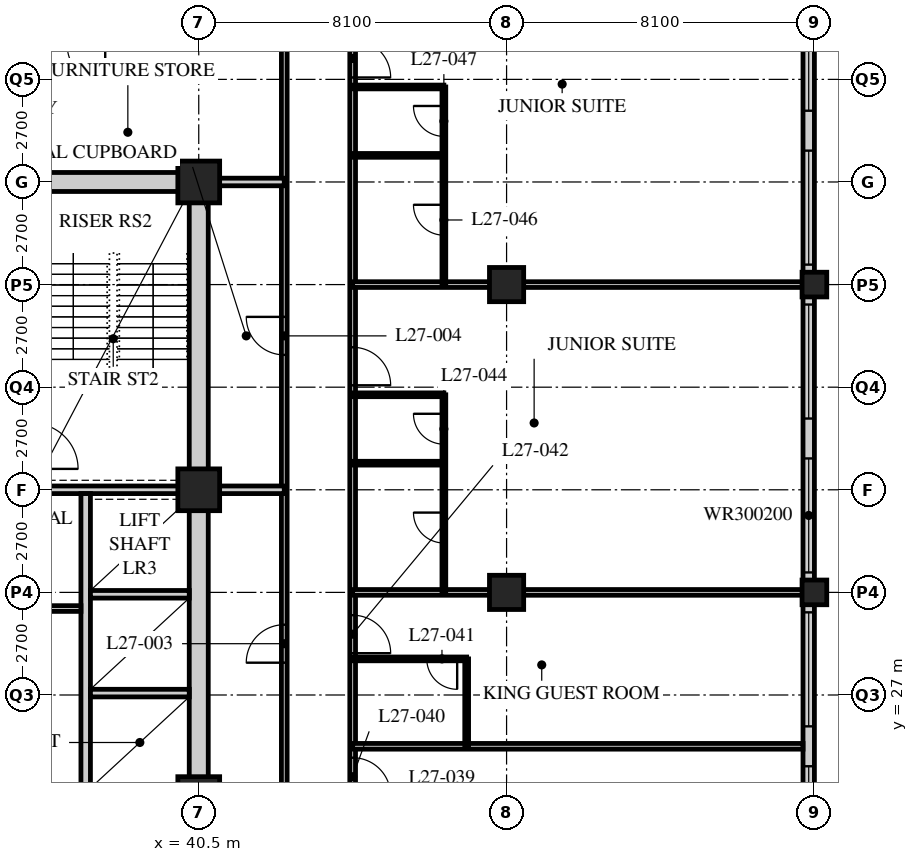
"""IFC4 building model, lengths in metres.
Left out: names, types, materials, properties, quantities, classifications, styles, units other than length and angle.
Written with IfcOpenShell. Run it as: python <this file> out.ifc"""

import sys

from ifc_helpers import new_model, si_unit, direction, frame, frame_2d, origin, origin_2d, place, context, subcontext, project, spatial, rectangle, hollow_rectangle, extrude, element, fill, save


model = new_model("IFC4")
c1 = context("Model", 3, precision=1e-05, world=origin(), true_north=direction((0.0, 1.0)))
c2 = subcontext(c1, "Body", "Model", "MODEL_VIEW")
j1 = project(units=[si_unit("LENGTHUNIT", "METRE"), si_unit("PLANEANGLEUNIT", "RADIAN")], contexts=[c1])
p1 = place(None, origin())
s1 = spatial("IfcSite", under=j1, at=p1, CompositionType="ELEMENT")
p2 = place(p1, origin())
s2 = spatial("IfcBuilding", under=s1, at=p2, CompositionType="ELEMENT")
p3 = place(p2, frame((0.0, 0.0, 110.2)))
s3 = spatial("IfcBuildingStorey", under=s2, at=p3, CompositionType="ELEMENT", Elevation=110.2)
for number, where, z_axis, x_axis in (
    (1, (40.5, 24.3, 0.0), (0.0, 0.0, 1.0), (1.0, 0.0, 0.0)),
    (2, (40.5, 32.4, 0.0), (0.0, 0.0, 1.0), (1.0, 0.0, 0.0)),
    (3, (40.5, 40.5, 0.0), (0.0, 0.0, 1.0), (1.0, 0.0, 0.0)),
):
    element("IfcColumn", number, at=place(p3, frame(where, z_axis=z_axis, x_axis=x_axis)), inside=s3, PredefinedType="COLUMN", context=c2, shape_type="SweptSolid", body=[
        extrude(hollow_rectangle(XDim=1.1, YDim=1.1, WallThickness=0.1, at=origin_2d()), origin(), (0.0, 0.0, 1.0), 3.4),
    ])
for number, where, z_axis, x_axis in (
    (4, (48.6, 29.7, 0.0), (0.0, 0.0, 1.0), (1.0, 0.0, 0.0)),
    (5, (48.6, 37.8, 0.0), (0.0, 0.0, 1.0), (1.0, 0.0, 0.0)),
):
    element("IfcColumn", number, at=place(p3, frame(where, z_axis=z_axis, x_axis=x_axis)), inside=s3, PredefinedType="COLUMN", context=c2, shape_type="SweptSolid", body=[
        extrude(hollow_rectangle(XDim=0.9, YDim=0.9, WallThickness=0.09, at=origin_2d()), origin(), (0.0, 0.0, 1.0), 3.4),
    ])
for number, where, z_axis, x_axis in (
    (6, (56.7, 29.7, 0.0), (0.0, 0.0, 1.0), (1.0, 0.0, 0.0)),
    (7, (56.7, 37.8, 0.0), (0.0, 0.0, 1.0), (1.0, 0.0, 0.0)),
):
    element("IfcColumn", number, at=place(p3, frame(where, z_axis=z_axis, x_axis=x_axis)), inside=s3, PredefinedType="COLUMN", context=c2, shape_type="SweptSolid", body=[
        extrude(hollow_rectangle(XDim=0.65, YDim=0.65, WallThickness=0.055, at=origin_2d()), origin(), (0.0, 0.0, 1.0), 3.4),
    ])
p4 = place(p3, frame((56.55, 13.8, 0.0), z_axis=(0.0, 0.0, 1.0), x_axis=(0.0, 1.0, 0.0)))
e8 = element("IfcWall", 8, at=p4, inside=s3, PredefinedType="SOLIDWALL", context=c2, shape_type="SweptSolid", body=[
    extrude(rectangle(XDim=32.1, YDim=0.3, at=frame_2d((16.05, 0.0))), origin(), (0.0, 0.0, 1.0), 3.19),
])
p5 = place(p4, frame((0.225, 0.0, 0.9)))
e9 = element("IfcOpeningElement", 9, at=p5, cuts=e8, PredefinedType="OPENING", context=c2, shape_type="SweptSolid", body=[
    extrude(rectangle(XDim=3.0, YDim=2.0, at=frame_2d((1.5, 1.0))), frame((0.0, 0.16, 0.0), z_axis=(0.0, -1.0, 0.0), x_axis=(1.0, 0.0, 0.0)), (0.0, 0.0, 1.0), 0.32),
])
p6 = place(p4, frame((4.275, 0.0, 0.9)))
e10 = element("IfcOpeningElement", 10, at=p6, cuts=e8, PredefinedType="OPENING", context=c2, shape_type="SweptSolid", body=[
    extrude(rectangle(XDim=3.0, YDim=2.0, at=frame_2d((1.5, 1.0))), frame((0.0, 0.16, 0.0), z_axis=(0.0, -1.0, 0.0), x_axis=(1.0, 0.0, 0.0)), (0.0, 0.0, 1.0), 0.32),
])
p7 = place(p4, frame((8.325, 0.0, 0.9)))
e11 = element("IfcOpeningElement", 11, at=p7, cuts=e8, PredefinedType="OPENING", context=c2, shape_type="SweptSolid", body=[
    extrude(rectangle(XDim=3.0, YDim=2.0, at=frame_2d((1.5, 1.0))), frame((0.0, 0.16, 0.0), z_axis=(0.0, -1.0, 0.0), x_axis=(1.0, 0.0, 0.0)), (0.0, 0.0, 1.0), 0.32),
])
p8 = place(p4, frame((12.375, 0.0, 0.9)))
e12 = element("IfcOpeningElement", 12, at=p8, cuts=e8, PredefinedType="OPENING", context=c2, shape_type="SweptSolid", body=[
    extrude(rectangle(XDim=3.0, YDim=2.0, at=frame_2d((1.5, 1.0))), frame((0.0, 0.16, 0.0), z_axis=(0.0, -1.0, 0.0), x_axis=(1.0, 0.0, 0.0)), (0.0, 0.0, 1.0), 0.32),
])
p9 = place(p4, frame((16.425, 0.0, 0.9)))
e13 = element("IfcOpeningElement", 13, at=p9, cuts=e8, PredefinedType="OPENING", context=c2, shape_type="SweptSolid", body=[
    extrude(rectangle(XDim=3.0, YDim=2.0, at=frame_2d((1.5, 1.0))), frame((0.0, 0.16, 0.0), z_axis=(0.0, -1.0, 0.0), x_axis=(1.0, 0.0, 0.0)), (0.0, 0.0, 1.0), 0.32),
])
p10 = place(p4, frame((20.475, 0.0, 0.9)))
e14 = element("IfcOpeningElement", 14, at=p10, cuts=e8, PredefinedType="OPENING", context=c2, shape_type="SweptSolid", body=[
    extrude(rectangle(XDim=3.0, YDim=2.0, at=frame_2d((1.5, 1.0))), frame((0.0, 0.16, 0.0), z_axis=(0.0, -1.0, 0.0), x_axis=(1.0, 0.0, 0.0)), (0.0, 0.0, 1.0), 0.32),
])
p11 = place(p4, frame((24.525, 0.0, 0.9)))
e15 = element("IfcOpeningElement", 15, at=p11, cuts=e8, PredefinedType="OPENING", context=c2, shape_type="SweptSolid", body=[
    extrude(rectangle(XDim=3.0, YDim=2.0, at=frame_2d((1.5, 1.0))), frame((0.0, 0.16, 0.0), z_axis=(0.0, -1.0, 0.0), x_axis=(1.0, 0.0, 0.0)), (0.0, 0.0, 1.0), 0.32),
])
p12 = place(p4, frame((28.575, 0.0, 0.9)))
e16 = element("IfcOpeningElement", 16, at=p12, cuts=e8, PredefinedType="OPENING", context=c2, shape_type="SweptSolid", body=[
    extrude(rectangle(XDim=3.0, YDim=2.0, at=frame_2d((1.5, 1.0))), frame((0.0, 0.16, 0.0), z_axis=(0.0, -1.0, 0.0), x_axis=(1.0, 0.0, 0.0)), (0.0, 0.0, 1.0), 0.32),
])
p13 = place(p3, frame((44.55, 21.6, 0.0), z_axis=(0.0, 0.0, 1.0), x_axis=(0.0, 1.0, 0.0)))
e17 = element("IfcWall", 17, at=p13, inside=s3, PredefinedType="PARTITIONING", context=c2, shape_type="SweptSolid", body=[
    extrude(rectangle(XDim=24.3, YDim=0.15, at=frame_2d((12.15, 0.0))), origin(), (0.0, 0.0, 1.0), 3.19),
])
p14 = place(p13, frame((2.75, 0.0, 0.0)))
e18 = element("IfcOpeningElement", 18, at=p14, cuts=e17, PredefinedType="OPENING", context=c2, shape_type="SweptSolid", body=[
    extrude(rectangle(XDim=1.0, YDim=2.1, at=frame_2d((0.5, 1.05))), frame((0.0, 0.085, 0.0), z_axis=(0.0, -1.0, 0.0), x_axis=(1.0, 0.0, 0.0)), (0.0, 0.0, 1.0), 0.17),
])
p15 = place(p13, frame((6.5, 0.0, 0.0)))
e19 = element("IfcOpeningElement", 19, at=p15, cuts=e17, PredefinedType="OPENING", context=c2, shape_type="SweptSolid", body=[
    extrude(rectangle(XDim=1.0, YDim=2.1, at=frame_2d((0.5, 1.05))), frame((0.0, 0.085, 0.0), z_axis=(0.0, -1.0, 0.0), x_axis=(1.0, 0.0, 0.0)), (0.0, 0.0, 1.0), 0.17),
])
p16 = place(p13, frame((13.55, 0.0, 0.0)))
e20 = element("IfcOpeningElement", 20, at=p16, cuts=e17, PredefinedType="OPENING", context=c2, shape_type="SweptSolid", body=[
    extrude(rectangle(XDim=1.0, YDim=2.1, at=frame_2d((0.5, 1.05))), frame((0.0, 0.085, 0.0), z_axis=(0.0, -1.0, 0.0), x_axis=(1.0, 0.0, 0.0)), (0.0, 0.0, 1.0), 0.17),
])
p17 = place(p13, frame((21.65, 0.0, 0.0)))
e21 = element("IfcOpeningElement", 21, at=p17, cuts=e17, PredefinedType="OPENING", context=c2, shape_type="SweptSolid", body=[
    extrude(rectangle(XDim=1.0, YDim=2.1, at=frame_2d((0.5, 1.05))), frame((0.0, 0.085, 0.0), z_axis=(0.0, -1.0, 0.0), x_axis=(1.0, 0.0, 0.0)), (0.0, 0.0, 1.0), 0.17),
])
p18 = place(p3, frame((42.75, 24.3, 0.0), z_axis=(0.0, 0.0, 1.0), x_axis=(0.0, 1.0, 0.0)))
e22 = element("IfcWall", 22, at=p18, inside=s3, PredefinedType="PARTITIONING", context=c2, shape_type="SweptSolid", body=[
    extrude(rectangle(XDim=19.8, YDim=0.15, at=frame_2d((9.9, 0.0))), origin(), (0.0, 0.0, 1.0), 3.19),
])
p19 = place(p18, frame((3.55, 0.0, 0.0)))
e23 = element("IfcOpeningElement", 23, at=p19, cuts=e22, PredefinedType="OPENING", context=c2, shape_type="SweptSolid", body=[
    extrude(rectangle(XDim=1.0, YDim=2.1, at=frame_2d((0.5, 1.05))), frame((0.0, 0.085, 0.0), z_axis=(0.0, -1.0, 0.0), x_axis=(1.0, 0.0, 0.0)), (0.0, 0.0, 1.0), 0.17),
])
p20 = place(p18, frame((11.65, 0.0, 0.0)))
e24 = element("IfcOpeningElement", 24, at=p20, cuts=e22, PredefinedType="OPENING", context=c2, shape_type="SweptSolid", body=[
    extrude(rectangle(XDim=1.0, YDim=2.1, at=frame_2d((0.5, 1.05))), frame((0.0, 0.085, 0.0), z_axis=(0.0, -1.0, 0.0), x_axis=(1.0, 0.0, 0.0)), (0.0, 0.0, 1.0), 0.17),
])
for number, where, z_axis, x_axis in (
    (25, (40.5, 32.4, 0.0), (0.0, 0.0, 1.0), (1.0, 0.0, 0.0)),
    (26, (40.5, 40.5, 0.0), (0.0, 0.0, 1.0), (1.0, 0.0, 0.0)),
):
    element("IfcWall", number, at=place(p3, frame(where, z_axis=z_axis, x_axis=x_axis)), inside=s3, PredefinedType="SOLIDWALL", context=c2, shape_type="SweptSolid", body=[
        extrude(rectangle(XDim=2.25, YDim=0.2, at=frame_2d((1.125, 0.0))), origin(), (0.0, 0.0, 1.0), 3.19),
    ])
p21 = place(p3, frame((44.55, 25.65, 0.0), z_axis=(0.0, 0.0, 1.0), x_axis=(1.0, 0.0, 0.0)))
e27 = element("IfcWall", 27, at=p21, inside=s3, PredefinedType="PARTITIONING", context=c2, shape_type="SweptSolid", body=[
    extrude(rectangle(XDim=11.85, YDim=0.15, at=frame_2d((5.925, 0.0))), origin(), (0.0, 0.0, 1.0), 3.19),
])
p22 = place(p3, frame((47.55, 25.65, 0.0), z_axis=(0.0, 0.0, 1.0), x_axis=(0.0, 1.0, 0.0)))
e28 = element("IfcWall", 28, at=p22, inside=s3, PredefinedType="PARTITIONING", context=c2, shape_type="SweptSolid", body=[
    extrude(rectangle(XDim=2.3, YDim=0.1, at=frame_2d((1.15, 0.0))), origin(), (0.0, 0.0, 1.0), 3.19),
])
p23 = place(p3, frame((44.55, 27.95, 0.0), z_axis=(0.0, 0.0, 1.0), x_axis=(1.0, 0.0, 0.0)))
e29 = element("IfcWall", 29, at=p23, inside=s3, PredefinedType="PARTITIONING", context=c2, shape_type="SweptSolid", body=[
    extrude(rectangle(XDim=3.0, YDim=0.1, at=frame_2d((1.5, 0.0))), origin(), (0.0, 0.0, 1.0), 3.19),
])
p24 = place(p23, frame((1.95, 0.0, 0.0)))
e30 = element("IfcOpeningElement", 30, at=p24, cuts=e29, PredefinedType="OPENING", context=c2, shape_type="SweptSolid", body=[
    extrude(rectangle(XDim=0.8, YDim=2.1, at=frame_2d((0.4, 1.05))), frame((0.0, 0.06, 0.0), z_axis=(0.0, -1.0, 0.0), x_axis=(1.0, 0.0, 0.0)), (0.0, 0.0, 1.0), 0.12),
])
p25 = place(p3, frame((44.55, 29.7, 0.0), z_axis=(0.0, 0.0, 1.0), x_axis=(1.0, 0.0, 0.0)))
e31 = element("IfcWall", 31, at=p25, inside=s3, PredefinedType="PARTITIONING", context=c2, shape_type="SweptSolid", body=[
    extrude(rectangle(XDim=11.85, YDim=0.15, at=frame_2d((5.925, 0.0))), origin(), (0.0, 0.0, 1.0), 2.578),
])
p26 = place(p3, frame((46.95, 29.7, 0.0), z_axis=(0.0, 0.0, 1.0), x_axis=(0.0, 1.0, 0.0)))
e32 = element("IfcWall", 32, at=p26, inside=s3, PredefinedType="PARTITIONING", context=c2, shape_type="SweptSolid", body=[
    extrude(rectangle(XDim=5.2, YDim=0.1, at=frame_2d((2.6, 0.0))), origin(), (0.0, 0.0, 1.0), 3.19),
])
p27 = place(p26, frame((1.3, 0.0, 0.0)))
e33 = element("IfcOpeningElement", 33, at=p27, cuts=e32, PredefinedType="OPENING", context=c2, shape_type="SweptSolid", body=[
    extrude(rectangle(XDim=0.8, YDim=2.1, at=frame_2d((0.4, 1.05))), frame((0.0, 0.06, 0.0), z_axis=(0.0, -1.0, 0.0), x_axis=(1.0, 0.0, 0.0)), (0.0, 0.0, 1.0), 0.12),
])
p28 = place(p26, frame((3.9, 0.0, 0.0)))
e34 = element("IfcOpeningElement", 34, at=p28, cuts=e32, PredefinedType="OPENING", context=c2, shape_type="SweptSolid", body=[
    extrude(rectangle(XDim=0.8, YDim=2.1, at=frame_2d((0.4, 1.05))), frame((0.0, 0.06, 0.0), z_axis=(0.0, -1.0, 0.0), x_axis=(1.0, 0.0, 0.0)), (0.0, 0.0, 1.0), 0.12),
])
for number, where, z_axis, x_axis in (
    (35, (44.55, 33.1, 0.0), (0.0, 0.0, 1.0), (1.0, 0.0, 0.0)),
    (36, (44.55, 34.9, 0.0), (0.0, 0.0, 1.0), (1.0, 0.0, 0.0)),
):
    element("IfcWall", number, at=place(p3, frame(where, z_axis=z_axis, x_axis=x_axis)), inside=s3, PredefinedType="PARTITIONING", context=c2, shape_type="SweptSolid", body=[
        extrude(rectangle(XDim=2.4, YDim=0.1, at=frame_2d((1.2, 0.0))), origin(), (0.0, 0.0, 1.0), 3.19),
    ])
p29 = place(p3, frame((44.55, 37.8, 0.0), z_axis=(0.0, 0.0, 1.0), x_axis=(1.0, 0.0, 0.0)))
e37 = element("IfcWall", 37, at=p29, inside=s3, PredefinedType="PARTITIONING", context=c2, shape_type="SweptSolid", body=[
    extrude(rectangle(XDim=11.85, YDim=0.15, at=frame_2d((5.925, 0.0))), origin(), (0.0, 0.0, 1.0), 2.578),
])
p30 = place(p3, frame((46.95, 37.8, 0.0), z_axis=(0.0, 0.0, 1.0), x_axis=(0.0, 1.0, 0.0)))
e38 = element("IfcWall", 38, at=p30, inside=s3, PredefinedType="PARTITIONING", context=c2, shape_type="SweptSolid", body=[
    extrude(rectangle(XDim=5.2, YDim=0.1, at=frame_2d((2.6, 0.0))), origin(), (0.0, 0.0, 1.0), 3.19),
])
p31 = place(p30, frame((1.3, 0.0, 0.0)))
e39 = element("IfcOpeningElement", 39, at=p31, cuts=e38, PredefinedType="OPENING", context=c2, shape_type="SweptSolid", body=[
    extrude(rectangle(XDim=0.8, YDim=2.1, at=frame_2d((0.4, 1.05))), frame((0.0, 0.06, 0.0), z_axis=(0.0, -1.0, 0.0), x_axis=(1.0, 0.0, 0.0)), (0.0, 0.0, 1.0), 0.12),
])
p32 = place(p30, frame((3.9, 0.0, 0.0)))
e40 = element("IfcOpeningElement", 40, at=p32, cuts=e38, PredefinedType="OPENING", context=c2, shape_type="SweptSolid", body=[
    extrude(rectangle(XDim=0.8, YDim=2.1, at=frame_2d((0.4, 1.05))), frame((0.0, 0.06, 0.0), z_axis=(0.0, -1.0, 0.0), x_axis=(1.0, 0.0, 0.0)), (0.0, 0.0, 1.0), 0.12),
])
for number, where, z_axis, x_axis in (
    (41, (44.55, 41.2, 0.0), (0.0, 0.0, 1.0), (1.0, 0.0, 0.0)),
    (42, (44.55, 43.0, 0.0), (0.0, 0.0, 1.0), (1.0, 0.0, 0.0)),
):
    element("IfcWall", number, at=place(p3, frame(where, z_axis=z_axis, x_axis=x_axis)), inside=s3, PredefinedType="PARTITIONING", context=c2, shape_type="SweptSolid", body=[
        extrude(rectangle(XDim=2.4, YDim=0.1, at=frame_2d((1.2, 0.0))), origin(), (0.0, 0.0, 1.0), 3.19),
    ])
p33 = place(p3, frame((15.95, 40.5, 0.0), z_axis=(0.0, 0.0, 1.0), x_axis=(1.0, 0.0, 0.0)))
e43 = element("IfcWall", 43, at=p33, inside=s3, PredefinedType="SOLIDWALL", context=c2, shape_type="SweptSolid", body=[
    extrude(rectangle(XDim=24.8, YDim=0.5, at=frame_2d((12.4, 0.0))), origin(), (0.0, 0.0, 1.0), 2.54),
])
p34 = place(p33, frame((11.5, 0.0, 0.0)))
e44 = element("IfcOpeningElement", 44, at=p34, cuts=e43, PredefinedType="OPENING", context=c2, shape_type="SweptSolid", body=[
    extrude(rectangle(XDim=1.8, YDim=2.4, at=frame_2d((0.9, 1.2))), frame((0.0, 0.26, 0.0), z_axis=(0.0, -1.0, 0.0), x_axis=(1.0, 0.0, 0.0)), (0.0, 0.0, 1.0), 0.52),
])
p35 = place(p3, frame((40.5, 24.55, 0.0), z_axis=(0.0, 0.0, 1.0), x_axis=(0.0, 1.0, 0.0)))
e45 = element("IfcWall", 45, at=p35, inside=s3, PredefinedType="SOLIDWALL", context=c2, shape_type="SweptSolid", body=[
    extrude(rectangle(XDim=15.7, YDim=0.5, at=frame_2d((7.85, 0.0))), origin(), (0.0, 0.0, 1.0), 2.578),
])
p36 = place(p3, frame((32.3, 32.4, 0.0), z_axis=(0.0, 0.0, 1.0), x_axis=(1.0, 0.0, 0.0)))
e46 = element("IfcWall", 46, at=p36, inside=s3, PredefinedType="SOLIDWALL", context=c2, shape_type="SweptSolid", body=[
    extrude(rectangle(XDim=7.95, YDim=0.2, at=frame_2d((3.975, 0.0))), origin(), (0.0, 0.0, 1.0), 2.578),
])
p37 = place(p3, frame((37.525, 24.55, 0.0), z_axis=(0.0, 0.0, 1.0), x_axis=(0.0, 1.0, 0.0)))
e47 = element("IfcWall", 47, at=p37, inside=s3, PredefinedType="SOLIDWALL", context=c2, shape_type="SweptSolid", body=[
    extrude(rectangle(XDim=7.75, YDim=0.25, at=frame_2d((3.875, 0.0))), origin(), (0.0, 0.0, 1.0), 3.19),
])
for number, where, z_axis, x_axis in (
    (48, (37.65, 27.05, 0.0), (0.0, 0.0, 1.0), (1.0, 0.0, 0.0)),
    (49, (37.65, 29.65, 0.0), (0.0, 0.0, 1.0), (1.0, 0.0, 0.0)),
):
    element("IfcWall", number, at=place(p3, frame(where, z_axis=z_axis, x_axis=x_axis)), inside=s3, PredefinedType="SOLIDWALL", context=c2, shape_type="SweptSolid", body=[
        extrude(rectangle(XDim=2.6, YDim=0.2, at=frame_2d((1.3, 0.0))), origin(), (0.0, 0.0, 1.0), 3.19),
    ])
p38 = place(p3, frame((32.5, 29.275, 0.0), z_axis=(0.0, 0.0, 1.0), x_axis=(1.0, 0.0, 0.0)))
e50 = element("IfcWall", 50, at=p38, inside=s3, PredefinedType="PARTITIONING", context=c2, shape_type="SweptSolid", body=[
    extrude(rectangle(XDim=4.9, YDim=0.15, at=frame_2d((2.45, 0.0))), origin(), (0.0, 0.0, 1.0), 3.19),
])
p39 = place(p7, origin())
e51 = element("IfcWindow", 51, at=p39, inside=s3, PartitioningType="SINGLE_PANEL", PredefinedType="WINDOW", context=c2, shape_type="SweptSolid", body=[
    extrude(rectangle(XDim=3.0, YDim=2.0, at=frame_2d((1.5, 1.0))), frame((0.0, 0.03, 0.0), z_axis=(0.0, -1.0, 0.0), x_axis=(1.0, 0.0, 0.0)), (0.0, 0.0, 1.0), 0.06),
])
fill(e11, e51)
p40 = place(p8, origin())
e52 = element("IfcWindow", 52, at=p40, inside=s3, PartitioningType="SINGLE_PANEL", PredefinedType="WINDOW", context=c2, shape_type="SweptSolid", body=[
    extrude(rectangle(XDim=3.0, YDim=2.0, at=frame_2d((1.5, 1.0))), frame((0.0, 0.03, 0.0), z_axis=(0.0, -1.0, 0.0), x_axis=(1.0, 0.0, 0.0)), (0.0, 0.0, 1.0), 0.06),
])
fill(e12, e52)
p41 = place(p9, origin())
e53 = element("IfcWindow", 53, at=p41, inside=s3, PartitioningType="SINGLE_PANEL", PredefinedType="WINDOW", context=c2, shape_type="SweptSolid", body=[
    extrude(rectangle(XDim=3.0, YDim=2.0, at=frame_2d((1.5, 1.0))), frame((0.0, 0.03, 0.0), z_axis=(0.0, -1.0, 0.0), x_axis=(1.0, 0.0, 0.0)), (0.0, 0.0, 1.0), 0.06),
])
fill(e13, e53)
p42 = place(p10, origin())
e54 = element("IfcWindow", 54, at=p42, inside=s3, PartitioningType="SINGLE_PANEL", PredefinedType="WINDOW", context=c2, shape_type="SweptSolid", body=[
    extrude(rectangle(XDim=3.0, YDim=2.0, at=frame_2d((1.5, 1.0))), frame((0.0, 0.03, 0.0), z_axis=(0.0, -1.0, 0.0), x_axis=(1.0, 0.0, 0.0)), (0.0, 0.0, 1.0), 0.06),
])
fill(e14, e54)
p43 = place(p11, origin())
e55 = element("IfcWindow", 55, at=p43, inside=s3, PartitioningType="SINGLE_PANEL", PredefinedType="WINDOW", context=c2, shape_type="SweptSolid", body=[
    extrude(rectangle(XDim=3.0, YDim=2.0, at=frame_2d((1.5, 1.0))), frame((0.0, 0.03, 0.0), z_axis=(0.0, -1.0, 0.0), x_axis=(1.0, 0.0, 0.0)), (0.0, 0.0, 1.0), 0.06),
])
fill(e15, e55)
p44 = place(p12, origin())
e56 = element("IfcWindow", 56, at=p44, inside=s3, PartitioningType="SINGLE_PANEL", PredefinedType="WINDOW", context=c2, shape_type="SweptSolid", body=[
    extrude(rectangle(XDim=3.0, YDim=2.0, at=frame_2d((1.5, 1.0))), frame((0.0, 0.03, 0.0), z_axis=(0.0, -1.0, 0.0), x_axis=(1.0, 0.0, 0.0)), (0.0, 0.0, 1.0), 0.06),
])
fill(e16, e56)
p45 = place(p19, origin())
e57 = element("IfcDoor", 57, at=p45, inside=s3, OperationType="SINGLE_SWING_LEFT", PredefinedType="DOOR", context=c2, shape_type="SweptSolid", body=[
    extrude(rectangle(XDim=1.0, YDim=2.1, at=frame_2d((0.5, 1.05))), frame((0.0, 0.025, 0.0), z_axis=(0.0, -1.0, 0.0), x_axis=(1.0, 0.0, 0.0)), (0.0, 0.0, 1.0), 0.05),
])
fill(e23, e57)
p46 = place(p20, origin())
e58 = element("IfcDoor", 58, at=p46, inside=s3, OperationType="SINGLE_SWING_RIGHT", PredefinedType="DOOR", context=c2, shape_type="SweptSolid", body=[
    extrude(rectangle(XDim=1.0, YDim=2.1, at=frame_2d((0.5, 1.05))), frame((0.0, 0.025, 0.0), z_axis=(0.0, -1.0, 0.0), x_axis=(1.0, 0.0, 0.0)), (0.0, 0.0, 1.0), 0.05),
])
fill(e24, e58)
p47 = place(p14, origin())
e59 = element("IfcDoor", 59, at=p47, inside=s3, OperationType="SINGLE_SWING_RIGHT", PredefinedType="DOOR", context=c2, shape_type="SweptSolid", body=[
    extrude(rectangle(XDim=1.0, YDim=2.1, at=frame_2d((0.5, 1.05))), frame((0.0, 0.025, 0.0), z_axis=(0.0, -1.0, 0.0), x_axis=(1.0, 0.0, 0.0)), (0.0, 0.0, 1.0), 0.05),
])
fill(e18, e59)
p48 = place(p24, origin())
e60 = element("IfcDoor", 60, at=p48, inside=s3, OperationType="SINGLE_SWING_LEFT", PredefinedType="DOOR", context=c2, shape_type="SweptSolid", body=[
    extrude(rectangle(XDim=0.8, YDim=2.1, at=frame_2d((0.4, 1.05))), frame((0.0, 0.025, 0.0), z_axis=(0.0, -1.0, 0.0), x_axis=(1.0, 0.0, 0.0)), (0.0, 0.0, 1.0), 0.05),
])
fill(e30, e60)
p49 = place(p15, origin())
e61 = element("IfcDoor", 61, at=p49, inside=s3, OperationType="SINGLE_SWING_RIGHT", PredefinedType="DOOR", context=c2, shape_type="SweptSolid", body=[
    extrude(rectangle(XDim=1.0, YDim=2.1, at=frame_2d((0.5, 1.05))), frame((0.0, 0.025, 0.0), z_axis=(0.0, -1.0, 0.0), x_axis=(1.0, 0.0, 0.0)), (0.0, 0.0, 1.0), 0.05),
])
fill(e19, e61)
p50 = place(p27, origin())
e62 = element("IfcDoor", 62, at=p50, inside=s3, OperationType="SINGLE_SWING_RIGHT", PredefinedType="DOOR", context=c2, shape_type="SweptSolid", body=[
    extrude(rectangle(XDim=0.8, YDim=2.1, at=frame_2d((0.4, 1.05))), frame((0.0, 0.025, 0.0), z_axis=(0.0, -1.0, 0.0), x_axis=(1.0, 0.0, 0.0)), (0.0, 0.0, 1.0), 0.05),
])
fill(e33, e62)
p51 = place(p28, origin())
e63 = element("IfcDoor", 63, at=p51, inside=s3, OperationType="SINGLE_SWING_RIGHT", PredefinedType="DOOR", context=c2, shape_type="SweptSolid", body=[
    extrude(rectangle(XDim=0.8, YDim=2.1, at=frame_2d((0.4, 1.05))), frame((0.0, 0.025, 0.0), z_axis=(0.0, -1.0, 0.0), x_axis=(1.0, 0.0, 0.0)), (0.0, 0.0, 1.0), 0.05),
])
fill(e34, e63)
p52 = place(p16, origin())
e64 = element("IfcDoor", 64, at=p52, inside=s3, OperationType="SINGLE_SWING_RIGHT", PredefinedType="DOOR", context=c2, shape_type="SweptSolid", body=[
    extrude(rectangle(XDim=1.0, YDim=2.1, at=frame_2d((0.5, 1.05))), frame((0.0, 0.025, 0.0), z_axis=(0.0, -1.0, 0.0), x_axis=(1.0, 0.0, 0.0)), (0.0, 0.0, 1.0), 0.05),
])
fill(e20, e64)
p53 = place(p31, origin())
e65 = element("IfcDoor", 65, at=p53, inside=s3, OperationType="SINGLE_SWING_RIGHT", PredefinedType="DOOR", context=c2, shape_type="SweptSolid", body=[
    extrude(rectangle(XDim=0.8, YDim=2.1, at=frame_2d((0.4, 1.05))), frame((0.0, 0.025, 0.0), z_axis=(0.0, -1.0, 0.0), x_axis=(1.0, 0.0, 0.0)), (0.0, 0.0, 1.0), 0.05),
])
fill(e39, e65)
p54 = place(p32, origin())
e66 = element("IfcDoor", 66, at=p54, inside=s3, OperationType="SINGLE_SWING_RIGHT", PredefinedType="DOOR", context=c2, shape_type="SweptSolid", body=[
    extrude(rectangle(XDim=0.8, YDim=2.1, at=frame_2d((0.4, 1.05))), frame((0.0, 0.025, 0.0), z_axis=(0.0, -1.0, 0.0), x_axis=(1.0, 0.0, 0.0)), (0.0, 0.0, 1.0), 0.05),
])
fill(e40, e66)
p55 = place(p17, origin())
e67 = element("IfcDoor", 67, at=p55, inside=s3, OperationType="SINGLE_SWING_RIGHT", PredefinedType="DOOR", context=c2, shape_type="SweptSolid", body=[
    extrude(rectangle(XDim=1.0, YDim=2.1, at=frame_2d((0.5, 1.05))), frame((0.0, 0.025, 0.0), z_axis=(0.0, -1.0, 0.0), x_axis=(1.0, 0.0, 0.0)), (0.0, 0.0, 1.0), 0.05),
])
fill(e21, e67)
save(model, sys.argv[1])
